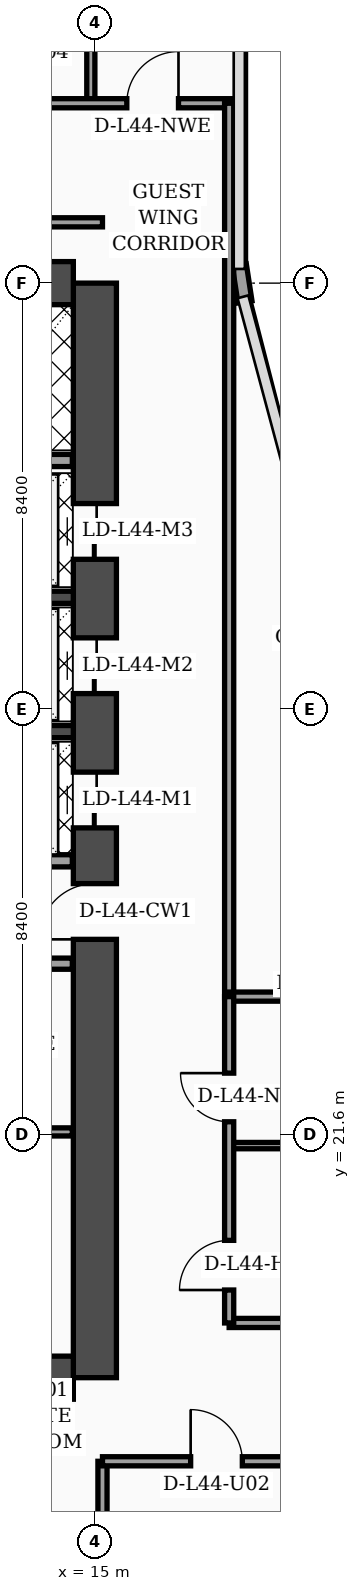
"""IFC4 building model, lengths in metres.
Left out: names, types, materials, properties, quantities, classifications, styles, units other than length and angle.
Written with IfcOpenShell. Run it as: python <this file> out.ifc"""

import sys

from ifc_helpers import new_model, si_unit, direction, frame, frame_2d, origin, place, context, subcontext, project, spatial, rectangle, extrude, element, fill, save


model = new_model("IFC4")
c1 = context("Model", 3, precision=1e-05, world=origin(), true_north=direction((0.0, 1.0)))
c2 = subcontext(c1, "Body", "Model", "MODEL_VIEW")
j1 = project(units=[si_unit("LENGTHUNIT", "METRE"), si_unit("PLANEANGLEUNIT", "RADIAN")], contexts=[c1])
p1 = place(None, origin())
s1 = spatial("IfcSite", under=j1, at=p1, CompositionType="ELEMENT")
p2 = place(p1, origin())
s2 = spatial("IfcBuilding", under=s1, at=p2, CompositionType="ELEMENT")
p3 = place(p2, frame((0.0, 0.0, 178.9)))
s3 = spatial("IfcBuildingStorey", under=s2, at=p3, CompositionType="ELEMENT", Elevation=178.9)
p4 = place(p3, frame((15.0, 16.8, 0.0), z_axis=(0.0, 0.0, 1.0), x_axis=(0.0, 1.0, 0.0)))
e1 = element("IfcWall", 1, at=p4, inside=s3, PredefinedType="SHEAR", context=c2, shape_type="SweptSolid", body=[
    extrude(rectangle(XDim=21.6, YDim=0.85, at=frame_2d((10.8, 0.0))), origin(), (0.0, 0.0, 1.0), 3.56),
])
p5 = place(p4, frame((8.65, 0.0, 0.0)))
e2 = element("IfcOpeningElement", 2, at=p5, cuts=e1, PredefinedType="OPENING", context=c2, shape_type="SweptSolid", body=[
    extrude(rectangle(XDim=1.1, YDim=2.2, at=frame_2d((0.55, 1.1))), frame((0.0, 0.435, 0.0), z_axis=(0.0, -1.0, 0.0), x_axis=(1.0, 0.0, 0.0)), (0.0, 0.0, 1.0), 0.87),
])
p6 = place(p4, frame((10.85, 0.0, 0.0)))
e3 = element("IfcOpeningElement", 3, at=p6, cuts=e1, PredefinedType="OPENING", context=c2, shape_type="SweptSolid", body=[
    extrude(rectangle(XDim=1.1, YDim=2.2, at=frame_2d((0.55, 1.1))), frame((0.0, 0.435, 0.0), z_axis=(0.0, -1.0, 0.0), x_axis=(1.0, 0.0, 0.0)), (0.0, 0.0, 1.0), 0.87),
])
p7 = place(p4, frame((13.5, 0.0, 0.0)))
e4 = element("IfcOpeningElement", 4, at=p7, cuts=e1, PredefinedType="OPENING", context=c2, shape_type="SweptSolid", body=[
    extrude(rectangle(XDim=1.1, YDim=2.2, at=frame_2d((0.55, 1.1))), frame((0.0, 0.435, 0.0), z_axis=(0.0, -1.0, 0.0), x_axis=(1.0, 0.0, 0.0)), (0.0, 0.0, 1.0), 0.87),
])
p8 = place(p4, frame((16.15, 0.0, 0.0)))
e5 = element("IfcOpeningElement", 5, at=p8, cuts=e1, PredefinedType="OPENING", context=c2, shape_type="SweptSolid", body=[
    extrude(rectangle(XDim=1.1, YDim=2.2, at=frame_2d((0.55, 1.1))), frame((0.0, 0.435, 0.0), z_axis=(0.0, -1.0, 0.0), x_axis=(1.0, 0.0, 0.0)), (0.0, 0.0, 1.0), 0.87),
])
for number, where, z_axis, x_axis in (
    (6, (4.625, 38.4, 0.0), (0.0, 0.0, 1.0), (1.0, 0.0, 0.0)),
    (7, (4.625, 16.8, 0.0), (0.0, 0.0, 1.0), (1.0, 0.0, 0.0)),
):
    element("IfcWall", number, at=place(p3, frame(where, z_axis=z_axis, x_axis=x_axis)), inside=s3, PredefinedType="SHEAR", context=c2, shape_type="SweptSolid", body=[
        extrude(rectangle(XDim=9.95, YDim=0.85, at=frame_2d((4.975, 0.0))), origin(), (0.0, 0.0, 1.0), 3.56),
    ])
for number, where, z_axis, x_axis in (
    (8, (12.18, 29.55, 0.0), (0.0, 0.0, 1.0), (1.0, 0.0, 0.0)),
    (9, (12.18, 32.2, 0.0), (0.0, 0.0, 1.0), (1.0, 0.0, 0.0)),
):
    element("IfcWall", number, at=place(p3, frame(where, z_axis=z_axis, x_axis=x_axis)), inside=s3, PredefinedType="SOLIDWALL", context=c2, shape_type="SweptSolid", body=[
        extrude(rectangle(XDim=2.395, YDim=0.24, at=frame_2d((1.198, 0.0))), origin(), (0.0, 0.0, 1.0), 3.56),
    ])
p9 = place(p3, frame((17.962, 38.03, 0.0), z_axis=(0.0, 0.0, 1.0), x_axis=(-0.15141125477, 0.988470855377, 0.0)))
e10 = element("IfcWall", 10, at=p9, inside=s3, PredefinedType="SOLIDWALL", context=c2, shape_type="SweptSolid", body=[
    extrude(rectangle(XDim=0.739, YDim=0.28, at=frame_2d((0.369, 0.0))), origin(), (0.0, 0.0, 1.0), 3.56),
])
p10 = place(p3, frame((9.68, 21.65, 0.0), z_axis=(0.0, 0.0, 1.0), x_axis=(1.0, 0.0, 0.0)))
e11 = element("IfcWall", 11, at=p10, inside=s3, PredefinedType="PARTITIONING", context=c2, shape_type="SweptSolid", body=[
    extrude(rectangle(XDim=4.875, YDim=0.16, at=frame_2d((2.438, 0.0))), origin(), (0.0, 0.0, 1.0), 3.09),
])
p11 = place(p10, frame((1.1, 0.0, 0.0)))
e12 = element("IfcOpeningElement", 12, at=p11, cuts=e11, PredefinedType="OPENING", context=c2, shape_type="SweptSolid", body=[
    extrude(rectangle(XDim=0.98, YDim=2.15, at=frame_2d((0.49, 1.075))), frame((0.0, 0.09, 0.0), z_axis=(0.0, -1.0, 0.0), x_axis=(1.0, 0.0, 0.0)), (0.0, 0.0, 1.0), 0.18),
])
p12 = place(p3, frame((9.68, 24.97, 0.0), z_axis=(0.0, 0.0, 1.0), x_axis=(1.0, 0.0, 0.0)))
e13 = element("IfcWall", 13, at=p12, inside=s3, PredefinedType="SOLIDWALL", context=c2, shape_type="SweptSolid", body=[
    extrude(rectangle(XDim=4.875, YDim=0.22, at=frame_2d((2.438, 0.0))), origin(), (0.0, 0.0, 1.0), 2.94),
])
p13 = place(p12, frame((0.9, 0.0, 0.0)))
e14 = element("IfcOpeningElement", 14, at=p13, cuts=e13, PredefinedType="OPENING", context=c2, shape_type="SweptSolid", body=[
    extrude(rectangle(XDim=0.98, YDim=2.15, at=frame_2d((0.49, 1.075))), frame((0.0, 0.12, 0.0), z_axis=(0.0, -1.0, 0.0), x_axis=(1.0, 0.0, 0.0)), (0.0, 0.0, 1.0), 0.24),
])
p14 = place(p3, frame((12.25, 27.0, 0.0), z_axis=(0.0, 0.0, 1.0), x_axis=(1.0, 0.0, 0.0)))
e15 = element("IfcWall", 15, at=p14, inside=s3, PredefinedType="SOLIDWALL", context=c2, shape_type="SweptSolid", body=[
    extrude(rectangle(XDim=2.305, YDim=0.24, at=frame_2d((1.152, 0.0))), origin(), (0.0, 0.0, 1.0), 3.56),
])
p15 = place(p3, frame((9.66, 34.9, 0.0), z_axis=(0.0, 0.0, 1.0), x_axis=(1.0, 0.0, 0.0)))
e16 = element("IfcWall", 16, at=p15, inside=s3, PredefinedType="SOLIDWALL", context=c2, shape_type="SweptSolid", body=[
    extrude(rectangle(XDim=4.895, YDim=0.24, at=frame_2d((2.448, 0.0))), origin(), (0.0, 0.0, 1.0), 3.56),
])
p16 = place(p3, frame((15.15, 2.44, 0.0), z_axis=(0.0, 0.0, 1.0), x_axis=(0.0, 1.0, 0.0)))
e17 = element("IfcWall", 17, at=p16, inside=s3, PredefinedType="PARTITIONING", context=c2, shape_type="SweptSolid", body=[
    extrude(rectangle(XDim=12.71, YDim=0.18, at=frame_2d((6.355, 0.0))), origin(), (0.0, 0.0, 1.0), 3.04),
])
p17 = place(p3, frame((15.15, 15.15, 0.0), z_axis=(0.0, 0.0, 1.0), x_axis=(1.0, 0.0, 0.0)))
e18 = element("IfcWall", 18, at=p17, inside=s3, PredefinedType="PARTITIONING", context=c2, shape_type="SweptSolid", body=[
    extrude(rectangle(XDim=6.45, YDim=0.18, at=frame_2d((3.225, 0.0))), origin(), (0.0, 0.0, 1.0), 2.49),
])
p18 = place(p17, frame((1.74, 0.0, 0.0)))
e19 = element("IfcOpeningElement", 19, at=p18, cuts=e18, PredefinedType="OPENING", context=c2, shape_type="SweptSolid", body=[
    extrude(rectangle(XDim=1.02, YDim=2.2, at=frame_2d((0.51, 1.1))), frame((0.0, 0.1, 0.0), z_axis=(0.0, -1.0, 0.0), x_axis=(1.0, 0.0, 0.0)), (0.0, 0.0, 1.0), 0.2),
])
p19 = place(p3, frame((14.92, 41.95, 0.0), z_axis=(0.0, 0.0, 1.0), x_axis=(0.0, 1.0, 0.0)))
e20 = element("IfcWall", 20, at=p19, inside=s3, PredefinedType="PARTITIONING", context=c2, shape_type="SweptSolid", body=[
    extrude(rectangle(XDim=5.85, YDim=0.16, at=frame_2d((2.925, 0.0))), origin(), (0.0, 0.0, 1.0), 3.04),
])
p20 = place(p3, frame((0.08, 41.95, 0.0), z_axis=(0.0, 0.0, 1.0), x_axis=(1.0, 0.0, 0.0)))
e21 = element("IfcWall", 21, at=p20, inside=s3, PredefinedType="PARTITIONING", context=c2, shape_type="SweptSolid", body=[
    extrude(rectangle(XDim=17.77, YDim=0.18, at=frame_2d((8.885, 0.0))), origin(), (0.0, 0.0, 1.0), 2.94),
])
p21 = place(p20, frame((0.9, 0.0, 0.0)))
e22 = element("IfcOpeningElement", 22, at=p21, cuts=e21, PredefinedType="OPENING", context=c2, shape_type="SweptSolid", body=[
    extrude(rectangle(XDim=1.02, YDim=2.2, at=frame_2d((0.51, 1.1))), frame((0.0, 0.1, 0.0), z_axis=(0.0, -1.0, 0.0), x_axis=(1.0, 0.0, 0.0)), (0.0, 0.0, 1.0), 0.2),
])
p22 = place(p20, frame((4.75, 0.0, 0.0)))
e23 = element("IfcOpeningElement", 23, at=p22, cuts=e21, PredefinedType="OPENING", context=c2, shape_type="SweptSolid", body=[
    extrude(rectangle(XDim=1.02, YDim=2.2, at=frame_2d((0.51, 1.1))), frame((0.0, 0.1, 0.0), z_axis=(0.0, -1.0, 0.0), x_axis=(1.0, 0.0, 0.0)), (0.0, 0.0, 1.0), 0.2),
])
p23 = place(p20, frame((10.63, 0.0, 0.0)))
e24 = element("IfcOpeningElement", 24, at=p23, cuts=e21, PredefinedType="OPENING", context=c2, shape_type="SweptSolid", body=[
    extrude(rectangle(XDim=1.02, YDim=2.2, at=frame_2d((0.51, 1.1))), frame((0.0, 0.1, 0.0), z_axis=(0.0, -1.0, 0.0), x_axis=(1.0, 0.0, 0.0)), (0.0, 0.0, 1.0), 0.2),
])
p24 = place(p20, frame((15.55, 0.0, 0.0)))
e25 = element("IfcOpeningElement", 25, at=p24, cuts=e21, PredefinedType="OPENING", context=c2, shape_type="SweptSolid", body=[
    extrude(rectangle(XDim=1.02, YDim=2.2, at=frame_2d((0.51, 1.1))), frame((0.0, 0.1, 0.0), z_axis=(0.0, -1.0, 0.0), x_axis=(1.0, 0.0, 0.0)), (0.0, 0.0, 1.0), 0.2),
])
p25 = place(p3, frame((17.65, 24.3, 0.0), z_axis=(0.0, 0.0, 1.0), x_axis=(0.0, 1.0, 0.0)))
e26 = element("IfcWall", 26, at=p25, inside=s3, PredefinedType="PARTITIONING", context=c2, shape_type="SweptSolid", body=[
    extrude(rectangle(XDim=17.65, YDim=0.18, at=frame_2d((8.825, 0.0))), origin(), (0.0, 0.0, 1.0), 2.94),
])
p26 = place(p3, frame((3.755, 39.6, 0.0), z_axis=(0.0, 0.0, 1.0), x_axis=(1.0, 0.0, 0.0)))
e27 = element("IfcWall", 27, at=p26, inside=s3, PredefinedType="PARTITIONING", context=c2, shape_type="SweptSolid", body=[
    extrude(rectangle(XDim=11.395, YDim=0.18, at=frame_2d((5.698, 0.0))), origin(), (0.0, 0.0, 1.0), 2.94),
])
p27 = place(p3, frame((17.65, 17.88, 0.0), z_axis=(0.0, 0.0, 1.0), x_axis=(1.0, 0.0, 0.0)))
e28 = element("IfcWall", 28, at=p27, inside=s3, PredefinedType="PARTITIONING", context=c2, shape_type="SweptSolid", body=[
    extrude(rectangle(XDim=3.9, YDim=0.18, at=frame_2d((1.95, 0.0))), origin(), (0.0, 0.0, 1.0), 3.56),
])
p28 = place(p3, frame((17.65, 21.38, 0.0), z_axis=(0.0, 0.0, 1.0), x_axis=(1.0, 0.0, 0.0)))
e29 = element("IfcWall", 29, at=p28, inside=s3, PredefinedType="PARTITIONING", context=c2, shape_type="SweptSolid", body=[
    extrude(rectangle(XDim=3.9, YDim=0.125, at=frame_2d((1.95, 0.0))), origin(), (0.0, 0.0, 1.0), 3.09),
])
p29 = place(p3, frame((17.65, 24.32, 0.0), z_axis=(0.0, 0.0, 1.0), x_axis=(1.0, 0.0, 0.0)))
e30 = element("IfcWall", 30, at=p29, inside=s3, PredefinedType="PARTITIONING", context=c2, shape_type="SweptSolid", body=[
    extrude(rectangle(XDim=3.95, YDim=0.18, at=frame_2d((1.975, 0.0))), origin(), (0.0, 0.0, 1.0), 3.56),
])
p30 = place(p3, frame((17.65, 17.88, 0.0), z_axis=(0.0, 0.0, 1.0), x_axis=(0.0, 1.0, 0.0)))
e31 = element("IfcWall", 31, at=p30, inside=s3, PredefinedType="PARTITIONING", context=c2, shape_type="SweptSolid", body=[
    extrude(rectangle(XDim=6.44, YDim=0.18, at=frame_2d((3.22, 0.0))), origin(), (0.0, 0.0, 1.0), 3.09),
])
p31 = place(p30, frame((0.65, 0.0, 0.0)))
e32 = element("IfcOpeningElement", 32, at=p31, cuts=e31, PredefinedType="OPENING", context=c2, shape_type="SweptSolid", body=[
    extrude(rectangle(XDim=0.98, YDim=2.15, at=frame_2d((0.49, 1.075))), frame((0.0, 0.1, 0.0), z_axis=(0.0, -1.0, 0.0), x_axis=(1.0, 0.0, 0.0)), (0.0, 0.0, 1.0), 0.2),
])
p32 = place(p30, frame((3.97, 0.0, 0.0)))
e33 = element("IfcOpeningElement", 33, at=p32, cuts=e31, PredefinedType="OPENING", context=c2, shape_type="SweptSolid", body=[
    extrude(rectangle(XDim=0.96, YDim=2.2, at=frame_2d((0.48, 1.1))), frame((0.0, 0.1, 0.0), z_axis=(0.0, -1.0, 0.0), x_axis=(1.0, 0.0, 0.0)), (0.0, 0.0, 1.0), 0.2),
])
p33 = place(p18, origin())
e34 = element("IfcDoor", 34, at=p33, inside=s3, OperationType="SINGLE_SWING_LEFT", PredefinedType="DOOR", context=c2, shape_type="SweptSolid", body=[
    extrude(rectangle(XDim=1.02, YDim=2.2, at=frame_2d((0.51, 1.1))), frame((0.0, 0.025, 0.0), z_axis=(0.0, -1.0, 0.0), x_axis=(1.0, 0.0, 0.0)), (0.0, 0.0, 1.0), 0.05),
])
fill(e19, e34)
p34 = place(p24, origin())
e35 = element("IfcDoor", 35, at=p34, inside=s3, OperationType="SINGLE_SWING_RIGHT", PredefinedType="DOOR", context=c2, shape_type="SweptSolid", body=[
    extrude(rectangle(XDim=1.02, YDim=2.2, at=frame_2d((0.51, 1.1))), frame((0.0, 0.025, 0.0), z_axis=(0.0, -1.0, 0.0), x_axis=(1.0, 0.0, 0.0)), (0.0, 0.0, 1.0), 0.05),
])
fill(e25, e35)
p35 = place(p31, origin())
e36 = element("IfcDoor", 36, at=p35, inside=s3, OperationType="SINGLE_SWING_LEFT", PredefinedType="DOOR", context=c2, shape_type="SweptSolid", body=[
    extrude(rectangle(XDim=0.98, YDim=2.15, at=frame_2d((0.49, 1.075))), frame((0.0, 0.025, 0.0), z_axis=(0.0, -1.0, 0.0), x_axis=(1.0, 0.0, 0.0)), (0.0, 0.0, 1.0), 0.05),
])
fill(e32, e36)
p36 = place(p32, origin())
e37 = element("IfcDoor", 37, at=p36, inside=s3, OperationType="SINGLE_SWING_RIGHT", PredefinedType="DOOR", context=c2, shape_type="SweptSolid", body=[
    extrude(rectangle(XDim=0.96, YDim=2.2, at=frame_2d((0.48, 1.1))), frame((0.0, 0.025, 0.0), z_axis=(0.0, -1.0, 0.0), x_axis=(1.0, 0.0, 0.0)), (0.0, 0.0, 1.0), 0.05),
])
fill(e33, e37)
p37 = place(p5, origin())
e38 = element("IfcDoor", 38, at=p37, inside=s3, OperationType="SINGLE_SWING_LEFT", PredefinedType="DOOR", context=c2, shape_type="SweptSolid", body=[
    extrude(rectangle(XDim=1.1, YDim=2.2, at=frame_2d((0.55, 1.1))), frame((0.0, 0.025, 0.0), z_axis=(0.0, -1.0, 0.0), x_axis=(1.0, 0.0, 0.0)), (0.0, 0.0, 1.0), 0.05),
])
fill(e2, e38)
p38 = place(p6, origin())
e39 = element("IfcDoor", 39, at=p38, inside=s3, OperationType="DOUBLE_DOOR_SLIDING", PredefinedType="DOOR", context=c2, shape_type="SweptSolid", body=[
    extrude(rectangle(XDim=1.1, YDim=2.2, at=frame_2d((0.55, 1.1))), frame((0.0, 0.025, 0.0), z_axis=(0.0, -1.0, 0.0), x_axis=(1.0, 0.0, 0.0)), (0.0, 0.0, 1.0), 0.05),
])
fill(e3, e39)
p39 = place(p7, origin())
e40 = element("IfcDoor", 40, at=p39, inside=s3, OperationType="DOUBLE_DOOR_SLIDING", PredefinedType="DOOR", context=c2, shape_type="SweptSolid", body=[
    extrude(rectangle(XDim=1.1, YDim=2.2, at=frame_2d((0.55, 1.1))), frame((0.0, 0.025, 0.0), z_axis=(0.0, -1.0, 0.0), x_axis=(1.0, 0.0, 0.0)), (0.0, 0.0, 1.0), 0.05),
])
fill(e4, e40)
p40 = place(p8, origin())
e41 = element("IfcDoor", 41, at=p40, inside=s3, OperationType="DOUBLE_DOOR_SLIDING", PredefinedType="DOOR", context=c2, shape_type="SweptSolid", body=[
    extrude(rectangle(XDim=1.1, YDim=2.2, at=frame_2d((0.55, 1.1))), frame((0.0, 0.025, 0.0), z_axis=(0.0, -1.0, 0.0), x_axis=(1.0, 0.0, 0.0)), (0.0, 0.0, 1.0), 0.05),
])
fill(e5, e41)
save(model, sys.argv[1])
